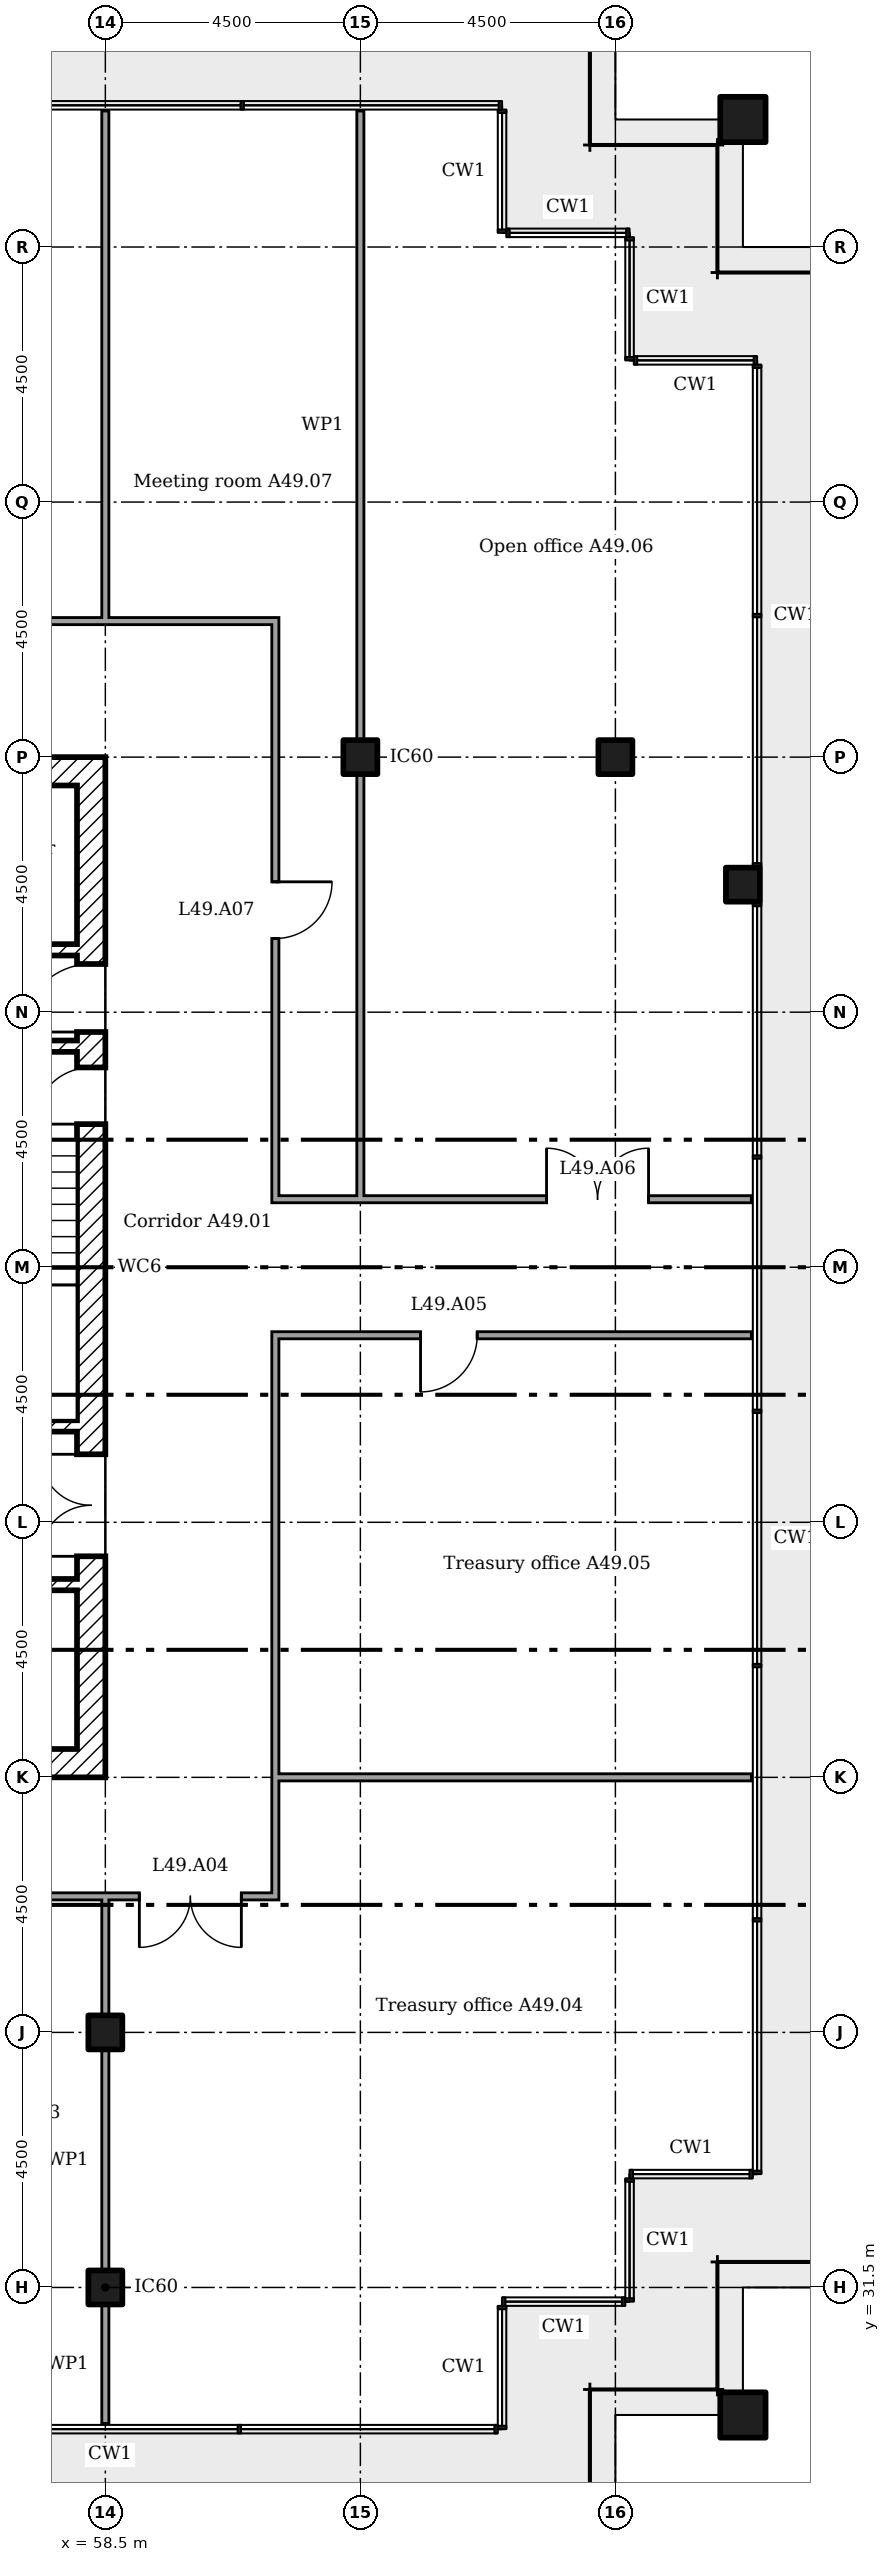
"""IFC4 building model, lengths in metres.
Left out: names, types, materials, properties, quantities, classifications, styles, units other than length and angle.
Written with IfcOpenShell. Run it as: python <this file> out.ifc"""

import sys

from ifc_helpers import new_model, si_unit, direction, frame, frame_2d, origin, origin_2d, place, context, subcontext, project, spatial, rectangle, extrude, element, fill, save


model = new_model("IFC4")
c1 = context("Model", 3, precision=1e-05, world=origin(), true_north=direction((0.0, 1.0)))
c2 = subcontext(c1, "Body", "Model", "MODEL_VIEW")
j1 = project(units=[si_unit("LENGTHUNIT", "METRE"), si_unit("PLANEANGLEUNIT", "RADIAN")], contexts=[c1])
p1 = place(None, origin())
s1 = spatial("IfcSite", under=j1, at=p1, CompositionType="ELEMENT")
p2 = place(p1, origin())
s2 = spatial("IfcBuilding", under=s1, at=p2, CompositionType="ELEMENT")
p3 = place(p2, frame((0.0, 0.0, 195.6)))
s3 = spatial("IfcBuildingStorey", under=s2, at=p3, CompositionType="ELEMENT", Elevation=195.6)
for number, where in (
    (1, (69.75, 29.25, 0.0)),
    (2, (69.75, 69.75, 0.0)),
):
    element("IfcColumn", number, at=place(p3, frame(where)), inside=s3, PredefinedType="COLUMN", context=c2, shape_type="SweptSolid", body=[
        extrude(rectangle(XDim=0.8, YDim=0.8, at=origin_2d()), origin(), (0.0, 0.0, 1.0), 3.6),
    ])
for number, where in (
    (3, (58.5, 31.5, 0.0)),
    (4, (58.5, 36.0, 0.0)),
    (5, (63.0, 58.5, 0.0)),
    (6, (67.5, 58.5, 0.0)),
    (7, (69.75, 56.25, 0.0)),
):
    element("IfcColumn", number, at=place(p3, frame(where)), inside=s3, PredefinedType="COLUMN", context=c2, shape_type="SweptSolid", body=[
        extrude(rectangle(XDim=0.6, YDim=0.6, at=origin_2d()), origin(), (0.0, 0.0, 1.0), 3.6),
    ])
p4 = place(p3, frame((58.25, 40.5, 0.0), z_axis=(0.0, 0.0, 1.0), x_axis=(0.0, 1.0, 0.0)))
e8 = element("IfcWall", 8, at=p4, inside=s3, PredefinedType="SHEAR", context=c2, shape_type="SweptSolid", body=[
    extrude(rectangle(XDim=18.0, YDim=0.5, at=frame_2d((9.0, 0.0))), origin(), (0.0, 0.0, 1.0), 3.35),
])
p5 = place(p4, frame((13.15, 0.0, 0.0)))
e9 = element("IfcOpeningElement", 9, at=p5, cuts=e8, PredefinedType="OPENING", context=c2, shape_type="SweptSolid", body=[
    extrude(rectangle(XDim=1.2, YDim=2.1, at=frame_2d((0.6, 1.05))), frame((0.0, 0.26, 0.0), z_axis=(0.0, -1.0, 0.0), x_axis=(1.0, 0.0, 0.0)), (0.0, 0.0, 1.0), 0.52),
])
p6 = place(p4, frame((3.9, 0.0, 0.0)))
e10 = element("IfcOpeningElement", 10, at=p6, cuts=e8, PredefinedType="OPENING", context=c2, shape_type="SweptSolid", body=[
    extrude(rectangle(XDim=1.8, YDim=2.1, at=frame_2d((0.9, 1.05))), frame((0.0, 0.26, 0.0), z_axis=(0.0, -1.0, 0.0), x_axis=(1.0, 0.0, 0.0)), (0.0, 0.0, 1.0), 0.52),
])
p7 = place(p4, frame((11.525, 0.0, 0.0)))
e11 = element("IfcOpeningElement", 11, at=p7, cuts=e8, PredefinedType="OPENING", context=c2, shape_type="SweptSolid", body=[
    extrude(rectangle(XDim=1.0, YDim=2.1, at=frame_2d((0.5, 1.05))), frame((0.0, 0.26, 0.0), z_axis=(0.0, -1.0, 0.0), x_axis=(1.0, 0.0, 0.0)), (0.0, 0.0, 1.0), 0.52),
])
for number, where in (
    (12, (40.5, 58.25, 0.0)),
    (13, (40.5, 40.75, 0.0)),
):
    element("IfcWall", number, at=place(p3, frame(where)), inside=s3, PredefinedType="SHEAR", context=c2, shape_type="SweptSolid", body=[
        extrude(rectangle(XDim=17.5, YDim=0.5, at=frame_2d((8.75, 0.0))), origin(), (0.0, 0.0, 1.0), 3.35),
    ])
p8 = place(p3, frame((46.933, 55.1, 0.0)))
e14 = element("IfcWall", 14, at=p8, inside=s3, PredefinedType="SHEAR", context=c2, shape_type="SweptSolid", body=[
    extrude(rectangle(XDim=11.067, YDim=0.2, at=frame_2d((5.533, 0.0))), origin(), (0.0, 0.0, 1.0), 3.35),
])
p9 = place(p8, frame((8.833, 0.0, 0.0)))
e15 = element("IfcOpeningElement", 15, at=p9, cuts=e14, PredefinedType="OPENING", context=c2, shape_type="SweptSolid", body=[
    extrude(rectangle(XDim=0.9, YDim=2.1, at=frame_2d((0.45, 1.05))), frame((0.0, 0.11, 0.0), z_axis=(0.0, -1.0, 0.0), x_axis=(1.0, 0.0, 0.0)), (0.0, 0.0, 1.0), 0.22),
])
p10 = place(p8, frame((0.633, 0.0, 0.0)))
e16 = element("IfcOpeningElement", 16, at=p10, cuts=e14, PredefinedType="OPENING", context=c2, shape_type="SweptSolid", body=[
    extrude(rectangle(XDim=1.2, YDim=2.1, at=frame_2d((0.6, 1.05))), frame((0.0, 0.11, 0.0), z_axis=(0.0, -1.0, 0.0), x_axis=(1.0, 0.0, 0.0)), (0.0, 0.0, 1.0), 0.22),
])
p11 = place(p8, frame((3.3, 0.0, 0.0)))
e17 = element("IfcOpeningElement", 17, at=p11, cuts=e14, PredefinedType="OPENING", context=c2, shape_type="SweptSolid", body=[
    extrude(rectangle(XDim=1.2, YDim=2.1, at=frame_2d((0.6, 1.05))), frame((0.0, 0.11, 0.0), z_axis=(0.0, -1.0, 0.0), x_axis=(1.0, 0.0, 0.0)), (0.0, 0.0, 1.0), 0.22),
])
p12 = place(p8, frame((5.967, 0.0, 0.0)))
e18 = element("IfcOpeningElement", 18, at=p12, cuts=e14, PredefinedType="OPENING", context=c2, shape_type="SweptSolid", body=[
    extrude(rectangle(XDim=1.2, YDim=2.1, at=frame_2d((0.6, 1.05))), frame((0.0, 0.11, 0.0), z_axis=(0.0, -1.0, 0.0), x_axis=(1.0, 0.0, 0.0)), (0.0, 0.0, 1.0), 0.22),
])
p13 = place(p3, frame((41.0, 43.9, 0.0)))
e19 = element("IfcWall", 19, at=p13, inside=s3, PredefinedType="SHEAR", context=c2, shape_type="SweptSolid", body=[
    extrude(rectangle(XDim=17.0, YDim=0.2, at=frame_2d((8.5, 0.0))), origin(), (0.0, 0.0, 1.0), 3.35),
])
p14 = place(p13, frame((4.05, 0.0, 0.0)))
e20 = element("IfcOpeningElement", 20, at=p14, cuts=e19, PredefinedType="OPENING", context=c2, shape_type="SweptSolid", body=[
    extrude(rectangle(XDim=0.9, YDim=2.1, at=frame_2d((0.45, 1.05))), frame((0.0, 0.11, 0.0), z_axis=(0.0, -1.0, 0.0), x_axis=(1.0, 0.0, 0.0)), (0.0, 0.0, 1.0), 0.22),
])
p15 = place(p13, frame((10.717, 0.0, 0.0)))
e21 = element("IfcOpeningElement", 21, at=p15, cuts=e19, PredefinedType="OPENING", context=c2, shape_type="SweptSolid", body=[
    extrude(rectangle(XDim=0.9, YDim=2.1, at=frame_2d((0.45, 1.05))), frame((0.0, 0.11, 0.0), z_axis=(0.0, -1.0, 0.0), x_axis=(1.0, 0.0, 0.0)), (0.0, 0.0, 1.0), 0.22),
])
p16 = place(p3, frame((54.8, 53.4, 0.0)))
e22 = element("IfcWall", 22, at=p16, inside=s3, PredefinedType="SHEAR", context=c2, shape_type="SweptSolid", body=[
    extrude(rectangle(XDim=3.2, YDim=0.2, at=frame_2d((1.6, 0.0))), origin(), (0.0, 0.0, 1.0), 3.35),
])
p17 = place(p16, frame((0.95, 0.0, 0.0)))
e23 = element("IfcOpeningElement", 23, at=p17, cuts=e22, PredefinedType="OPENING", context=c2, shape_type="SweptSolid", body=[
    extrude(rectangle(XDim=1.0, YDim=2.1, at=frame_2d((0.5, 1.05))), frame((0.0, 0.11, 0.0), z_axis=(0.0, -1.0, 0.0), x_axis=(1.0, 0.0, 0.0)), (0.0, 0.0, 1.0), 0.22),
])
p18 = place(p3, frame((54.8, 46.7, 0.0)))
e24 = element("IfcWall", 24, at=p18, inside=s3, PredefinedType="SHEAR", context=c2, shape_type="SweptSolid", body=[
    extrude(rectangle(XDim=3.2, YDim=0.2, at=frame_2d((1.6, 0.0))), origin(), (0.0, 0.0, 1.0), 3.35),
])
p19 = place(p3, frame((42.5, 38.4, 0.0)))
e25 = element("IfcWall", 25, at=p19, inside=s3, PredefinedType="PARTITIONING", context=c2, shape_type="SweptSolid", body=[
    extrude(rectangle(XDim=19.062, YDim=0.125, at=frame_2d((9.531, 0.0))), origin(), (0.0, 0.0, 1.0), 3.45),
])
p20 = place(p19, frame((0.35, 0.0, 0.0)))
e26 = element("IfcOpeningElement", 26, at=p20, cuts=e25, PredefinedType="OPENING", context=c2, shape_type="SweptSolid", body=[
    extrude(rectangle(XDim=1.8, YDim=2.1, at=frame_2d((0.9, 1.05))), frame((0.0, 0.073, 0.0), z_axis=(0.0, -1.0, 0.0), x_axis=(1.0, 0.0, 0.0)), (0.0, 0.0, 1.0), 0.145),
])
p21 = place(p19, frame((5.258, 0.0, 0.0)))
e27 = element("IfcOpeningElement", 27, at=p21, cuts=e25, PredefinedType="OPENING", context=c2, shape_type="SweptSolid", body=[
    extrude(rectangle(XDim=1.0, YDim=2.1, at=frame_2d((0.5, 1.05))), frame((0.0, 0.073, 0.0), z_axis=(0.0, -1.0, 0.0), x_axis=(1.0, 0.0, 0.0)), (0.0, 0.0, 1.0), 0.145),
])
p22 = place(p19, frame((13.705, 0.0, 0.0)))
e28 = element("IfcOpeningElement", 28, at=p22, cuts=e25, PredefinedType="OPENING", context=c2, shape_type="SweptSolid", body=[
    extrude(rectangle(XDim=1.0, YDim=2.1, at=frame_2d((0.5, 1.05))), frame((0.0, 0.073, 0.0), z_axis=(0.0, -1.0, 0.0), x_axis=(1.0, 0.0, 0.0)), (0.0, 0.0, 1.0), 0.145),
])
p23 = place(p19, frame((16.6, 0.0, 0.0)))
e29 = element("IfcOpeningElement", 29, at=p23, cuts=e25, PredefinedType="OPENING", context=c2, shape_type="SweptSolid", body=[
    extrude(rectangle(XDim=1.8, YDim=2.1, at=frame_2d((0.9, 1.05))), frame((0.0, 0.073, 0.0), z_axis=(0.0, -1.0, 0.0), x_axis=(1.0, 0.0, 0.0)), (0.0, 0.0, 1.0), 0.145),
])
p24 = place(p3, frame((61.5, 40.5, 0.0)))
e30 = element("IfcWall", 30, at=p24, inside=s3, PredefinedType="PARTITIONING", context=c2, shape_type="SweptSolid", body=[
    extrude(rectangle(XDim=8.4, YDim=0.125, at=frame_2d((4.2, 0.0))), origin(), (0.0, 0.0, 1.0), 2.772),
])
p25 = place(p3, frame((61.438, 48.3, 0.0)))
e31 = element("IfcWall", 31, at=p25, inside=s3, PredefinedType="PARTITIONING", context=c2, shape_type="SweptSolid", body=[
    extrude(rectangle(XDim=8.462, YDim=0.125, at=frame_2d((4.231, 0.0))), origin(), (0.0, 0.0, 1.0), 3.45),
])
p26 = place(p25, frame((2.625, 0.0, 0.0)))
e32 = element("IfcOpeningElement", 32, at=p26, cuts=e31, PredefinedType="OPENING", context=c2, shape_type="SweptSolid", body=[
    extrude(rectangle(XDim=1.0, YDim=2.1, at=frame_2d((0.5, 1.05))), frame((0.0, 0.073, 0.0), z_axis=(0.0, -1.0, 0.0), x_axis=(1.0, 0.0, 0.0)), (0.0, 0.0, 1.0), 0.145),
])
p27 = place(p3, frame((61.438, 50.7, 0.0)))
e33 = element("IfcWall", 33, at=p27, inside=s3, PredefinedType="PARTITIONING", context=c2, shape_type="SweptSolid", body=[
    extrude(rectangle(XDim=8.462, YDim=0.125, at=frame_2d((4.231, 0.0))), origin(), (0.0, 0.0, 1.0), 3.45),
])
p28 = place(p27, frame((4.847, 0.0, 0.0)))
e34 = element("IfcOpeningElement", 34, at=p28, cuts=e33, PredefinedType="OPENING", context=c2, shape_type="SweptSolid", body=[
    extrude(rectangle(XDim=1.8, YDim=2.1, at=frame_2d((0.9, 1.05))), frame((0.0, 0.073, 0.0), z_axis=(0.0, -1.0, 0.0), x_axis=(1.0, 0.0, 0.0)), (0.0, 0.0, 1.0), 0.145),
])
p29 = place(p3, frame((42.6, 60.9, 0.0)))
e35 = element("IfcWall", 35, at=p29, inside=s3, PredefinedType="PARTITIONING", context=c2, shape_type="SweptSolid", body=[
    extrude(rectangle(XDim=18.962, YDim=0.125, at=frame_2d((9.481, 0.0))), origin(), (0.0, 0.0, 1.0), 3.45),
])
p30 = place(p29, frame((12.695, 0.0, 0.0)))
e36 = element("IfcOpeningElement", 36, at=p30, cuts=e35, PredefinedType="OPENING", context=c2, shape_type="SweptSolid", body=[
    extrude(rectangle(XDim=1.0, YDim=2.1, at=frame_2d((0.5, 1.05))), frame((0.0, 0.073, 0.0), z_axis=(0.0, -1.0, 0.0), x_axis=(1.0, 0.0, 0.0)), (0.0, 0.0, 1.0), 0.145),
])
p31 = place(p29, frame((6.322, 0.0, 0.0)))
e37 = element("IfcOpeningElement", 37, at=p31, cuts=e35, PredefinedType="OPENING", context=c2, shape_type="SweptSolid", body=[
    extrude(rectangle(XDim=1.8, YDim=2.1, at=frame_2d((0.9, 1.05))), frame((0.0, 0.073, 0.0), z_axis=(0.0, -1.0, 0.0), x_axis=(1.0, 0.0, 0.0)), (0.0, 0.0, 1.0), 0.145),
])
p32 = place(p3, frame((58.5, 29.1, 0.0), z_axis=(0.0, 0.0, 1.0), x_axis=(0.0, 1.0, 0.0)))
e38 = element("IfcWall", 38, at=p32, inside=s3, PredefinedType="PARTITIONING", context=c2, shape_type="SweptSolid", body=[
    extrude(rectangle(XDim=2.1, YDim=0.125, at=frame_2d((1.05, 0.0))), origin(), (0.0, 0.0, 1.0), 2.676),
])
p33 = place(p3, frame((58.5, 31.8, 0.0), z_axis=(0.0, 0.0, 1.0), x_axis=(0.0, 1.0, 0.0)))
e39 = element("IfcWall", 39, at=p33, inside=s3, PredefinedType="PARTITIONING", context=c2, shape_type="SweptSolid", body=[
    extrude(rectangle(XDim=3.9, YDim=0.125, at=frame_2d((1.95, 0.0))), origin(), (0.0, 0.0, 1.0), 2.676),
])
p34 = place(p3, frame((58.5, 36.3, 0.0), z_axis=(0.0, 0.0, 1.0), x_axis=(0.0, 1.0, 0.0)))
e40 = element("IfcWall", 40, at=p34, inside=s3, PredefinedType="PARTITIONING", context=c2, shape_type="SweptSolid", body=[
    extrude(rectangle(XDim=2.1, YDim=0.125, at=frame_2d((1.05, 0.0))), origin(), (0.0, 0.0, 1.0), 2.676),
])
p35 = place(p3, frame((58.5, 60.9, 0.0), z_axis=(0.0, 0.0, 1.0), x_axis=(0.0, 1.0, 0.0)))
e41 = element("IfcWall", 41, at=p35, inside=s3, PredefinedType="PARTITIONING", context=c2, shape_type="SweptSolid", body=[
    extrude(rectangle(XDim=9.0, YDim=0.125, at=frame_2d((4.5, 0.0))), origin(), (0.0, 0.0, 1.0), 2.772),
])
p36 = place(p3, frame((61.5, 38.462, 0.0), z_axis=(0.0, 0.0, 1.0), x_axis=(0.0, 1.0, 0.0)))
e42 = element("IfcWall", 42, at=p36, inside=s3, PredefinedType="PARTITIONING", context=c2, shape_type="SweptSolid", body=[
    extrude(rectangle(XDim=9.775, YDim=0.125, at=frame_2d((4.888, 0.0))), origin(), (0.0, 0.0, 1.0), 3.45),
])
p37 = place(p3, frame((61.5, 50.762, 0.0), z_axis=(0.0, 0.0, 1.0), x_axis=(0.0, 1.0, 0.0)))
e43 = element("IfcWall", 43, at=p37, inside=s3, PredefinedType="PARTITIONING", context=c2, shape_type="SweptSolid", body=[
    extrude(rectangle(XDim=10.075, YDim=0.125, at=frame_2d((5.038, 0.0))), origin(), (0.0, 0.0, 1.0), 3.45),
])
p38 = place(p37, frame((4.538, 0.0, 0.0)))
e44 = element("IfcOpeningElement", 44, at=p38, cuts=e43, PredefinedType="OPENING", context=c2, shape_type="SweptSolid", body=[
    extrude(rectangle(XDim=1.0, YDim=2.1, at=frame_2d((0.5, 1.05))), frame((0.0, 0.073, 0.0), z_axis=(0.0, -1.0, 0.0), x_axis=(1.0, 0.0, 0.0)), (0.0, 0.0, 1.0), 0.145),
])
p39 = place(p3, frame((63.0, 50.7, 0.0), z_axis=(0.0, 0.0, 1.0), x_axis=(0.0, 1.0, 0.0)))
e45 = element("IfcWall", 45, at=p39, inside=s3, PredefinedType="PARTITIONING", context=c2, shape_type="SweptSolid", body=[
    extrude(rectangle(XDim=7.5, YDim=0.125, at=frame_2d((3.75, 0.0))), origin(), (0.0, 0.0, 1.0), 3.45),
])
p40 = place(p3, frame((63.0, 58.8, 0.0), z_axis=(0.0, 0.0, 1.0), x_axis=(0.0, 1.0, 0.0)))
e46 = element("IfcWall", 46, at=p40, inside=s3, PredefinedType="PARTITIONING", context=c2, shape_type="SweptSolid", body=[
    extrude(rectangle(XDim=11.1, YDim=0.125, at=frame_2d((5.55, 0.0))), origin(), (0.0, 0.0, 1.0), 2.772),
])
p41 = place(p5, origin())
e47 = element("IfcDoor", 47, at=p41, inside=s3, OperationType="SINGLE_SWING_RIGHT", PredefinedType="DOOR", context=c2, shape_type="SweptSolid", body=[
    extrude(rectangle(XDim=1.2, YDim=2.1, at=frame_2d((0.6, 1.05))), frame((0.0, 0.025, 0.0), z_axis=(0.0, -1.0, 0.0), x_axis=(1.0, 0.0, 0.0)), (0.0, 0.0, 1.0), 0.05),
])
fill(e9, e47)
p42 = place(p6, origin())
e48 = element("IfcDoor", 48, at=p42, inside=s3, OperationType="DOUBLE_DOOR_SINGLE_SWING", PredefinedType="DOOR", context=c2, shape_type="SweptSolid", body=[
    extrude(rectangle(XDim=1.8, YDim=2.1, at=frame_2d((0.9, 1.05))), frame((0.0, 0.025, 0.0), z_axis=(0.0, -1.0, 0.0), x_axis=(1.0, 0.0, 0.0)), (0.0, 0.0, 1.0), 0.05),
])
fill(e10, e48)
p43 = place(p7, origin())
e49 = element("IfcDoor", 49, at=p43, inside=s3, OperationType="SINGLE_SWING_RIGHT", PredefinedType="DOOR", context=c2, shape_type="SweptSolid", body=[
    extrude(rectangle(XDim=1.0, YDim=2.1, at=frame_2d((0.5, 1.05))), frame((0.0, 0.025, 0.0), z_axis=(0.0, -1.0, 0.0), x_axis=(1.0, 0.0, 0.0)), (0.0, 0.0, 1.0), 0.05),
])
fill(e11, e49)
p44 = place(p23, frame((1.8, 0.0, 0.0), x_axis=(-1.0, 0.0, 0.0)))
e50 = element("IfcDoor", 50, at=p44, inside=s3, OperationType="DOUBLE_DOOR_SINGLE_SWING", PredefinedType="DOOR", context=c2, shape_type="SweptSolid", body=[
    extrude(rectangle(XDim=1.8, YDim=2.1, at=frame_2d((0.9, 1.05))), frame((0.0, 0.025, 0.0), z_axis=(0.0, -1.0, 0.0), x_axis=(1.0, 0.0, 0.0)), (0.0, 0.0, 1.0), 0.05),
])
fill(e29, e50)
p45 = place(p26, frame((1.0, 0.0, 0.0), x_axis=(-1.0, 0.0, 0.0)))
e51 = element("IfcDoor", 51, at=p45, inside=s3, OperationType="SINGLE_SWING_LEFT", PredefinedType="DOOR", context=c2, shape_type="SweptSolid", body=[
    extrude(rectangle(XDim=1.0, YDim=2.1, at=frame_2d((0.5, 1.05))), frame((0.0, 0.025, 0.0), z_axis=(0.0, -1.0, 0.0), x_axis=(1.0, 0.0, 0.0)), (0.0, 0.0, 1.0), 0.05),
])
fill(e32, e51)
p46 = place(p28, origin())
e52 = element("IfcDoor", 52, at=p46, inside=s3, OperationType="DOUBLE_DOOR_SINGLE_SWING", PredefinedType="DOOR", context=c2, shape_type="SweptSolid", body=[
    extrude(rectangle(XDim=1.8, YDim=2.1, at=frame_2d((0.9, 1.05))), frame((0.0, 0.025, 0.0), z_axis=(0.0, -1.0, 0.0), x_axis=(1.0, 0.0, 0.0)), (0.0, 0.0, 1.0), 0.05),
])
fill(e34, e52)
p47 = place(p38, frame((1.0, 0.0, 0.0), x_axis=(-1.0, 0.0, 0.0)))
e53 = element("IfcDoor", 53, at=p47, inside=s3, OperationType="SINGLE_SWING_RIGHT", PredefinedType="DOOR", context=c2, shape_type="SweptSolid", body=[
    extrude(rectangle(XDim=1.0, YDim=2.1, at=frame_2d((0.5, 1.05))), frame((0.0, 0.025, 0.0), z_axis=(0.0, -1.0, 0.0), x_axis=(1.0, 0.0, 0.0)), (0.0, 0.0, 1.0), 0.05),
])
fill(e44, e53)
save(model, sys.argv[1])
